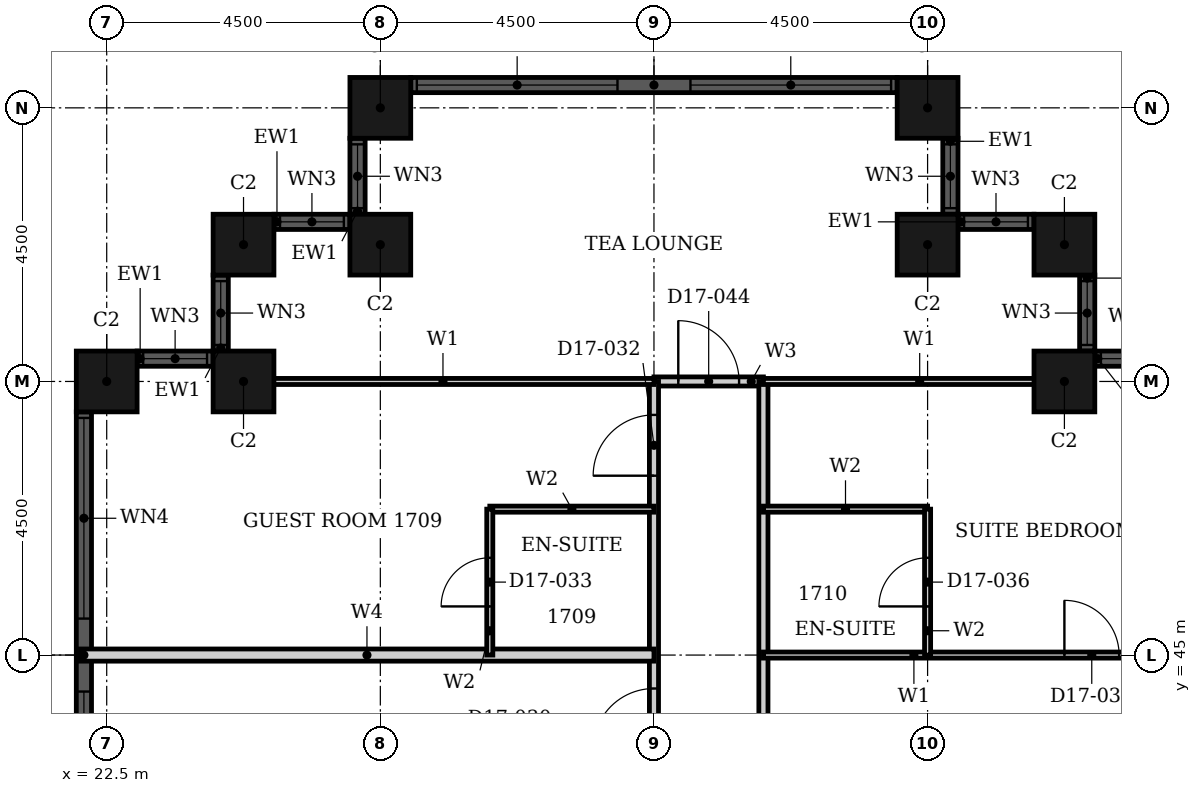
"""IFC4 building model, lengths in metres.
Left out: names, types, materials, properties, quantities, classifications, styles, units other than length and angle.
Written with IfcOpenShell. Run it as: python <this file> out.ifc"""

import sys

from ifc_helpers import new_model, si_unit, direction, frame, frame_2d, origin, origin_2d, place, context, subcontext, project, spatial, rectangle, hollow_rectangle, extrude, element, fill, save


model = new_model("IFC4")
c1 = context("Model", 3, precision=1e-05, world=origin(), true_north=direction((0.0, 1.0)))
c2 = subcontext(c1, "Body", "Model", "MODEL_VIEW")
j1 = project(units=[si_unit("LENGTHUNIT", "METRE"), si_unit("PLANEANGLEUNIT", "RADIAN")], contexts=[c1])
p1 = place(None, origin())
s1 = spatial("IfcSite", under=j1, at=p1, CompositionType="ELEMENT")
p2 = place(p1, origin())
s2 = spatial("IfcBuilding", under=s1, at=p2, CompositionType="ELEMENT")
p3 = place(p2, frame((0.0, 0.0, 74.4)))
s3 = spatial("IfcBuildingStorey", under=s2, at=p3, CompositionType="ELEMENT", Elevation=74.4)
for number, where, z_axis, x_axis in (
    (1, (38.25, 49.5, 0.0), (0.0, 0.0, 1.0), (1.0, 0.0, 0.0)),
    (2, (38.25, 51.75, 0.0), (0.0, 0.0, 1.0), (1.0, 0.0, 0.0)),
    (3, (36.0, 51.75, 0.0), (0.0, 0.0, 1.0), (1.0, 0.0, 0.0)),
    (4, (36.0, 54.0, 0.0), (0.0, 0.0, 1.0), (1.0, 0.0, 0.0)),
    (5, (27.0, 54.0, 0.0), (0.0, 0.0, 1.0), (1.0, 0.0, 0.0)),
    (6, (27.0, 51.75, 0.0), (0.0, 0.0, 1.0), (1.0, 0.0, 0.0)),
    (7, (24.75, 51.75, 0.0), (0.0, 0.0, 1.0), (1.0, 0.0, 0.0)),
    (8, (24.75, 49.5, 0.0), (0.0, 0.0, 1.0), (1.0, 0.0, 0.0)),
    (9, (22.5, 49.5, 0.0), (0.0, 0.0, 1.0), (1.0, 0.0, 0.0)),
):
    element("IfcColumn", number, at=place(p3, frame(where, z_axis=z_axis, x_axis=x_axis)), inside=s3, PredefinedType="COLUMN", context=c2, shape_type="SweptSolid", body=[
        extrude(hollow_rectangle(XDim=1.0, YDim=1.0, WallThickness=0.032, at=origin_2d()), origin(), (0.0, 0.0, 1.0), 3.6),
    ])
p4 = place(p3, frame((40.0, 49.875, 0.0), z_axis=(0.0, 0.0, 1.0), x_axis=(-1.0, 0.0, 0.0)))
e10 = element("IfcWall", 10, at=p4, inside=s3, PredefinedType="SOLIDWALL", context=c2, shape_type="SweptSolid", body=[
    extrude(rectangle(XDim=1.25, YDim=0.25, at=frame_2d((0.625, 0.0))), origin(), (0.0, 0.0, 1.0), 3.6),
])
p5 = place(p4, frame((0.1, 0.0, 0.9)))
e11 = element("IfcOpeningElement", 11, at=p5, cuts=e10, PredefinedType="OPENING", context=c2, shape_type="SweptSolid", body=[
    extrude(rectangle(XDim=1.05, YDim=2.08, at=frame_2d((0.525, 1.04))), frame((0.0, 0.135, 0.0), z_axis=(0.0, -1.0, 0.0), x_axis=(1.0, 0.0, 0.0)), (0.0, 0.0, 1.0), 0.27),
])
p6 = place(p3, frame((38.625, 50.0, 0.0), z_axis=(0.0, 0.0, 1.0), x_axis=(0.0, 1.0, 0.0)))
e12 = element("IfcWall", 12, at=p6, inside=s3, PredefinedType="SOLIDWALL", context=c2, shape_type="SweptSolid", body=[
    extrude(rectangle(XDim=1.25, YDim=0.25, at=frame_2d((0.625, 0.0))), origin(), (0.0, 0.0, 1.0), 3.6),
])
p7 = place(p6, frame((0.1, 0.0, 0.9)))
e13 = element("IfcOpeningElement", 13, at=p7, cuts=e12, PredefinedType="OPENING", context=c2, shape_type="SweptSolid", body=[
    extrude(rectangle(XDim=1.05, YDim=2.08, at=frame_2d((0.525, 1.04))), frame((0.0, 0.135, 0.0), z_axis=(0.0, -1.0, 0.0), x_axis=(1.0, 0.0, 0.0)), (0.0, 0.0, 1.0), 0.27),
])
p8 = place(p3, frame((37.75, 52.125, 0.0), z_axis=(0.0, 0.0, 1.0), x_axis=(-1.0, 0.0, 0.0)))
e14 = element("IfcWall", 14, at=p8, inside=s3, PredefinedType="SOLIDWALL", context=c2, shape_type="SweptSolid", body=[
    extrude(rectangle(XDim=1.25, YDim=0.25, at=frame_2d((0.625, 0.0))), origin(), (0.0, 0.0, 1.0), 3.6),
])
p9 = place(p8, frame((0.1, 0.0, 0.9)))
e15 = element("IfcOpeningElement", 15, at=p9, cuts=e14, PredefinedType="OPENING", context=c2, shape_type="SweptSolid", body=[
    extrude(rectangle(XDim=1.05, YDim=2.08, at=frame_2d((0.525, 1.04))), frame((0.0, 0.135, 0.0), z_axis=(0.0, -1.0, 0.0), x_axis=(1.0, 0.0, 0.0)), (0.0, 0.0, 1.0), 0.27),
])
p10 = place(p3, frame((36.375, 52.25, 0.0), z_axis=(0.0, 0.0, 1.0), x_axis=(0.0, 1.0, 0.0)))
e16 = element("IfcWall", 16, at=p10, inside=s3, PredefinedType="SOLIDWALL", context=c2, shape_type="SweptSolid", body=[
    extrude(rectangle(XDim=1.25, YDim=0.25, at=frame_2d((0.625, 0.0))), origin(), (0.0, 0.0, 1.0), 3.6),
])
p11 = place(p10, frame((0.1, 0.0, 0.9)))
e17 = element("IfcOpeningElement", 17, at=p11, cuts=e16, PredefinedType="OPENING", context=c2, shape_type="SweptSolid", body=[
    extrude(rectangle(XDim=1.05, YDim=2.08, at=frame_2d((0.525, 1.04))), frame((0.0, 0.135, 0.0), z_axis=(0.0, -1.0, 0.0), x_axis=(1.0, 0.0, 0.0)), (0.0, 0.0, 1.0), 0.27),
])
p12 = place(p3, frame((35.5, 54.375, 0.0), z_axis=(0.0, 0.0, 1.0), x_axis=(-1.0, 0.0, 0.0)))
e18 = element("IfcWall", 18, at=p12, inside=s3, PredefinedType="SOLIDWALL", context=c2, shape_type="SweptSolid", body=[
    extrude(rectangle(XDim=8.0, YDim=0.25, at=frame_2d((4.0, 0.0))), origin(), (0.0, 0.0, 1.0), 3.6),
])
p13 = place(p12, frame((0.1, 0.0, 0.9)))
e19 = element("IfcOpeningElement", 19, at=p13, cuts=e18, PredefinedType="OPENING", context=c2, shape_type="SweptSolid", body=[
    extrude(rectangle(XDim=3.3, YDim=2.08, at=frame_2d((1.65, 1.04))), frame((0.0, 0.135, 0.0), z_axis=(0.0, -1.0, 0.0), x_axis=(1.0, 0.0, 0.0)), (0.0, 0.0, 1.0), 0.27),
])
p14 = place(p12, frame((4.6, 0.0, 0.9)))
e20 = element("IfcOpeningElement", 20, at=p14, cuts=e18, PredefinedType="OPENING", context=c2, shape_type="SweptSolid", body=[
    extrude(rectangle(XDim=3.3, YDim=2.08, at=frame_2d((1.65, 1.04))), frame((0.0, 0.135, 0.0), z_axis=(0.0, -1.0, 0.0), x_axis=(1.0, 0.0, 0.0)), (0.0, 0.0, 1.0), 0.27),
])
p15 = place(p3, frame((26.625, 53.5, 0.0), z_axis=(0.0, 0.0, 1.0), x_axis=(0.0, -1.0, 0.0)))
e21 = element("IfcWall", 21, at=p15, inside=s3, PredefinedType="SOLIDWALL", context=c2, shape_type="SweptSolid", body=[
    extrude(rectangle(XDim=1.25, YDim=0.25, at=frame_2d((0.625, 0.0))), origin(), (0.0, 0.0, 1.0), 3.6),
])
p16 = place(p15, frame((0.1, 0.0, 0.9)))
e22 = element("IfcOpeningElement", 22, at=p16, cuts=e21, PredefinedType="OPENING", context=c2, shape_type="SweptSolid", body=[
    extrude(rectangle(XDim=1.05, YDim=2.08, at=frame_2d((0.525, 1.04))), frame((0.0, 0.135, 0.0), z_axis=(0.0, -1.0, 0.0), x_axis=(1.0, 0.0, 0.0)), (0.0, 0.0, 1.0), 0.27),
])
p17 = place(p3, frame((26.5, 52.125, 0.0), z_axis=(0.0, 0.0, 1.0), x_axis=(-1.0, 0.0, 0.0)))
e23 = element("IfcWall", 23, at=p17, inside=s3, PredefinedType="SOLIDWALL", context=c2, shape_type="SweptSolid", body=[
    extrude(rectangle(XDim=1.25, YDim=0.25, at=frame_2d((0.625, 0.0))), origin(), (0.0, 0.0, 1.0), 3.6),
])
p18 = place(p17, frame((0.1, 0.0, 0.9)))
e24 = element("IfcOpeningElement", 24, at=p18, cuts=e23, PredefinedType="OPENING", context=c2, shape_type="SweptSolid", body=[
    extrude(rectangle(XDim=1.05, YDim=2.08, at=frame_2d((0.525, 1.04))), frame((0.0, 0.135, 0.0), z_axis=(0.0, -1.0, 0.0), x_axis=(1.0, 0.0, 0.0)), (0.0, 0.0, 1.0), 0.27),
])
p19 = place(p3, frame((24.375, 51.25, 0.0), z_axis=(0.0, 0.0, 1.0), x_axis=(0.0, -1.0, 0.0)))
e25 = element("IfcWall", 25, at=p19, inside=s3, PredefinedType="SOLIDWALL", context=c2, shape_type="SweptSolid", body=[
    extrude(rectangle(XDim=1.25, YDim=0.25, at=frame_2d((0.625, 0.0))), origin(), (0.0, 0.0, 1.0), 3.6),
])
p20 = place(p19, frame((0.1, 0.0, 0.9)))
e26 = element("IfcOpeningElement", 26, at=p20, cuts=e25, PredefinedType="OPENING", context=c2, shape_type="SweptSolid", body=[
    extrude(rectangle(XDim=1.05, YDim=2.08, at=frame_2d((0.525, 1.04))), frame((0.0, 0.135, 0.0), z_axis=(0.0, -1.0, 0.0), x_axis=(1.0, 0.0, 0.0)), (0.0, 0.0, 1.0), 0.27),
])
p21 = place(p3, frame((24.25, 49.875, 0.0), z_axis=(0.0, 0.0, 1.0), x_axis=(-1.0, 0.0, 0.0)))
e27 = element("IfcWall", 27, at=p21, inside=s3, PredefinedType="SOLIDWALL", context=c2, shape_type="SweptSolid", body=[
    extrude(rectangle(XDim=1.25, YDim=0.25, at=frame_2d((0.625, 0.0))), origin(), (0.0, 0.0, 1.0), 3.6),
])
p22 = place(p21, frame((0.1, 0.0, 0.9)))
e28 = element("IfcOpeningElement", 28, at=p22, cuts=e27, PredefinedType="OPENING", context=c2, shape_type="SweptSolid", body=[
    extrude(rectangle(XDim=1.05, YDim=2.08, at=frame_2d((0.525, 1.04))), frame((0.0, 0.135, 0.0), z_axis=(0.0, -1.0, 0.0), x_axis=(1.0, 0.0, 0.0)), (0.0, 0.0, 1.0), 0.27),
])
p23 = place(p3, frame((22.125, 49.0, 0.0), z_axis=(0.0, 0.0, 1.0), x_axis=(0.0, -1.0, 0.0)))
e29 = element("IfcWall", 29, at=p23, inside=s3, PredefinedType="SOLIDWALL", context=c2, shape_type="SweptSolid", body=[
    extrude(rectangle(XDim=8.0, YDim=0.25, at=frame_2d((4.0, 0.0))), origin(), (0.0, 0.0, 1.0), 3.6),
])
p24 = place(p23, frame((0.1, 0.0, 0.9)))
e30 = element("IfcOpeningElement", 30, at=p24, cuts=e29, PredefinedType="OPENING", context=c2, shape_type="SweptSolid", body=[
    extrude(rectangle(XDim=3.3, YDim=2.08, at=frame_2d((1.65, 1.04))), frame((0.0, 0.135, 0.0), z_axis=(0.0, -1.0, 0.0), x_axis=(1.0, 0.0, 0.0)), (0.0, 0.0, 1.0), 0.27),
])
p25 = place(p23, frame((4.6, 0.0, 0.9)))
e31 = element("IfcOpeningElement", 31, at=p25, cuts=e29, PredefinedType="OPENING", context=c2, shape_type="SweptSolid", body=[
    extrude(rectangle(XDim=3.3, YDim=2.08, at=frame_2d((1.65, 1.04))), frame((0.0, 0.135, 0.0), z_axis=(0.0, -1.0, 0.0), x_axis=(1.0, 0.0, 0.0)), (0.0, 0.0, 1.0), 0.27),
])
p26 = place(p3, frame((31.5, 49.5, 0.0), z_axis=(0.0, 0.0, 1.0), x_axis=(1.0, 0.0, 0.0)))
e32 = element("IfcWall", 32, at=p26, inside=s3, PredefinedType="PARTITIONING", context=c2, shape_type="SweptSolid", body=[
    extrude(rectangle(XDim=1.8, YDim=0.15, at=frame_2d((0.9, 0.0))), origin(), (0.0, 0.0, 1.0), 3.3),
])
p27 = place(p26, frame((0.4, 0.0, 0.0)))
e33 = element("IfcOpeningElement", 33, at=p27, cuts=e32, PredefinedType="OPENING", context=c2, shape_type="SweptSolid", body=[
    extrude(rectangle(XDim=1.0, YDim=2.1, at=frame_2d((0.5, 1.05))), frame((0.0, 0.085, 0.0), z_axis=(0.0, -1.0, 0.0), x_axis=(1.0, 0.0, 0.0)), (0.0, 0.0, 1.0), 0.17),
])
p28 = place(p3, frame((31.5, 33.3, 0.0), z_axis=(0.0, 0.0, 1.0), x_axis=(0.0, 1.0, 0.0)))
e34 = element("IfcWall", 34, at=p28, inside=s3, PredefinedType="PARTITIONING", context=c2, shape_type="SweptSolid", body=[
    extrude(rectangle(XDim=16.2, YDim=0.15, at=frame_2d((8.1, 0.0))), origin(), (0.0, 0.0, 1.0), 2.58),
])
p29 = place(p28, frame((10.15, 0.0, 0.0)))
e35 = element("IfcOpeningElement", 35, at=p29, cuts=e34, PredefinedType="OPENING", context=c2, shape_type="SweptSolid", body=[
    extrude(rectangle(XDim=1.0, YDim=2.1, at=frame_2d((0.5, 1.05))), frame((0.0, 0.085, 0.0), z_axis=(0.0, -1.0, 0.0), x_axis=(1.0, 0.0, 0.0)), (0.0, 0.0, 1.0), 0.17),
])
p30 = place(p28, frame((14.65, 0.0, 0.0)))
e36 = element("IfcOpeningElement", 36, at=p30, cuts=e34, PredefinedType="OPENING", context=c2, shape_type="SweptSolid", body=[
    extrude(rectangle(XDim=1.0, YDim=2.1, at=frame_2d((0.5, 1.05))), frame((0.0, 0.085, 0.0), z_axis=(0.0, -1.0, 0.0), x_axis=(1.0, 0.0, 0.0)), (0.0, 0.0, 1.0), 0.17),
])
p31 = place(p3, frame((33.3, 33.3, 0.0), z_axis=(0.0, 0.0, 1.0), x_axis=(0.0, 1.0, 0.0)))
e37 = element("IfcWall", 37, at=p31, inside=s3, PredefinedType="PARTITIONING", context=c2, shape_type="SweptSolid", body=[
    extrude(rectangle(XDim=16.2, YDim=0.15, at=frame_2d((8.1, 0.0))), origin(), (0.0, 0.0, 1.0), 3.3),
])
p32 = place(p31, frame((8.95, 0.0, 0.0)))
e38 = element("IfcOpeningElement", 38, at=p32, cuts=e37, PredefinedType="OPENING", context=c2, shape_type="SweptSolid", body=[
    extrude(rectangle(XDim=1.0, YDim=2.1, at=frame_2d((0.5, 1.05))), frame((0.0, 0.085, 0.0), z_axis=(0.0, -1.0, 0.0), x_axis=(1.0, 0.0, 0.0)), (0.0, 0.0, 1.0), 0.17),
])
p33 = place(p3, frame((33.3, 45.0, 0.0), z_axis=(0.0, 0.0, 1.0), x_axis=(1.0, 0.0, 0.0)))
e39 = element("IfcWall", 39, at=p33, inside=s3, PredefinedType="PARTITIONING", context=c2, shape_type="SweptSolid", body=[
    extrude(rectangle(XDim=7.64, YDim=0.1, at=frame_2d((3.82, 0.0))), origin(), (0.0, 0.0, 1.0), 3.3),
])
p34 = place(p33, frame((4.95, 0.0, 0.0)))
e40 = element("IfcOpeningElement", 40, at=p34, cuts=e39, PredefinedType="OPENING", context=c2, shape_type="SweptSolid", body=[
    extrude(rectangle(XDim=0.9, YDim=2.1, at=frame_2d((0.45, 1.05))), frame((0.0, 0.06, 0.0), z_axis=(0.0, -1.0, 0.0), x_axis=(1.0, 0.0, 0.0)), (0.0, 0.0, 1.0), 0.12),
])
p35 = place(p3, frame((24.56, 49.5, 0.0), z_axis=(0.0, 0.0, 1.0), x_axis=(1.0, 0.0, 0.0)))
e41 = element("IfcWall", 41, at=p35, inside=s3, PredefinedType="PARTITIONING", context=c2, shape_type="SweptSolid", body=[
    extrude(rectangle(XDim=6.94, YDim=0.1, at=frame_2d((3.47, 0.0))), origin(), (0.0, 0.0, 1.0), 3.3),
])
p36 = place(p3, frame((33.3, 49.5, 0.0), z_axis=(0.0, 0.0, 1.0), x_axis=(1.0, 0.0, 0.0)))
e42 = element("IfcWall", 42, at=p36, inside=s3, PredefinedType="PARTITIONING", context=c2, shape_type="SweptSolid", body=[
    extrude(rectangle(XDim=5.14, YDim=0.1, at=frame_2d((2.57, 0.0))), origin(), (0.0, 0.0, 1.0), 3.3),
])
p37 = place(p3, frame((22.06, 45.0, 0.0), z_axis=(0.0, 0.0, 1.0), x_axis=(1.0, 0.0, 0.0)))
e43 = element("IfcWall", 43, at=p37, inside=s3, PredefinedType="PARTITIONING", context=c2, shape_type="SweptSolid", body=[
    extrude(rectangle(XDim=9.44, YDim=0.2, at=frame_2d((4.72, 0.0))), origin(), (0.0, 0.0, 1.0), 3.3),
])
for number, where, z_axis, x_axis in (
    (44, (28.8, 47.4, 0.0), (0.0, 0.0, 1.0), (1.0, 0.0, 0.0)),
    (45, (33.3, 47.4, 0.0), (0.0, 0.0, 1.0), (1.0, 0.0, 0.0)),
):
    element("IfcWall", number, at=place(p3, frame(where, z_axis=z_axis, x_axis=x_axis)), inside=s3, PredefinedType="PARTITIONING", context=c2, shape_type="SweptSolid", body=[
        extrude(rectangle(XDim=2.7, YDim=0.1, at=frame_2d((1.35, 0.0))), origin(), (0.0, 0.0, 1.0), 3.3),
    ])
p38 = place(p3, frame((28.8, 45.0, 0.0), z_axis=(0.0, 0.0, 1.0), x_axis=(0.0, 1.0, 0.0)))
e46 = element("IfcWall", 46, at=p38, inside=s3, PredefinedType="PARTITIONING", context=c2, shape_type="SweptSolid", body=[
    extrude(rectangle(XDim=2.4, YDim=0.1, at=frame_2d((1.2, 0.0))), origin(), (0.0, 0.0, 1.0), 3.3),
])
p39 = place(p38, frame((0.8, 0.0, 0.0)))
e47 = element("IfcOpeningElement", 47, at=p39, cuts=e46, PredefinedType="OPENING", context=c2, shape_type="SweptSolid", body=[
    extrude(rectangle(XDim=0.8, YDim=2.1, at=frame_2d((0.4, 1.05))), frame((0.0, 0.06, 0.0), z_axis=(0.0, -1.0, 0.0), x_axis=(1.0, 0.0, 0.0)), (0.0, 0.0, 1.0), 0.12),
])
p40 = place(p3, frame((36.0, 45.0, 0.0), z_axis=(0.0, 0.0, 1.0), x_axis=(0.0, 1.0, 0.0)))
e48 = element("IfcWall", 48, at=p40, inside=s3, PredefinedType="PARTITIONING", context=c2, shape_type="SweptSolid", body=[
    extrude(rectangle(XDim=2.4, YDim=0.1, at=frame_2d((1.2, 0.0))), origin(), (0.0, 0.0, 1.0), 2.58),
])
p41 = place(p40, frame((0.8, 0.0, 0.0)))
e49 = element("IfcOpeningElement", 49, at=p41, cuts=e48, PredefinedType="OPENING", context=c2, shape_type="SweptSolid", body=[
    extrude(rectangle(XDim=0.8, YDim=2.1, at=frame_2d((0.4, 1.05))), frame((0.0, 0.06, 0.0), z_axis=(0.0, -1.0, 0.0), x_axis=(1.0, 0.0, 0.0)), (0.0, 0.0, 1.0), 0.12),
])
p42 = place(p5, origin())
e50 = element("IfcWindow", 50, at=p42, inside=s3, PartitioningType="SINGLE_PANEL", PredefinedType="WINDOW", context=c2, shape_type="SweptSolid", body=[
    extrude(rectangle(XDim=1.05, YDim=2.08, at=frame_2d((0.525, 1.04))), frame((0.0, 0.03, 0.0), z_axis=(0.0, -1.0, 0.0), x_axis=(1.0, 0.0, 0.0)), (0.0, 0.0, 1.0), 0.06),
])
fill(e11, e50)
p43 = place(p7, origin())
e51 = element("IfcWindow", 51, at=p43, inside=s3, PartitioningType="SINGLE_PANEL", PredefinedType="WINDOW", context=c2, shape_type="SweptSolid", body=[
    extrude(rectangle(XDim=1.05, YDim=2.08, at=frame_2d((0.525, 1.04))), frame((0.0, 0.03, 0.0), z_axis=(0.0, -1.0, 0.0), x_axis=(1.0, 0.0, 0.0)), (0.0, 0.0, 1.0), 0.06),
])
fill(e13, e51)
p44 = place(p9, origin())
e52 = element("IfcWindow", 52, at=p44, inside=s3, PartitioningType="SINGLE_PANEL", PredefinedType="WINDOW", context=c2, shape_type="SweptSolid", body=[
    extrude(rectangle(XDim=1.05, YDim=2.08, at=frame_2d((0.525, 1.04))), frame((0.0, 0.03, 0.0), z_axis=(0.0, -1.0, 0.0), x_axis=(1.0, 0.0, 0.0)), (0.0, 0.0, 1.0), 0.06),
])
fill(e15, e52)
p45 = place(p11, origin())
e53 = element("IfcWindow", 53, at=p45, inside=s3, PartitioningType="SINGLE_PANEL", PredefinedType="WINDOW", context=c2, shape_type="SweptSolid", body=[
    extrude(rectangle(XDim=1.05, YDim=2.08, at=frame_2d((0.525, 1.04))), frame((0.0, 0.03, 0.0), z_axis=(0.0, -1.0, 0.0), x_axis=(1.0, 0.0, 0.0)), (0.0, 0.0, 1.0), 0.06),
])
fill(e17, e53)
p46 = place(p13, origin())
e54 = element("IfcWindow", 54, at=p46, inside=s3, PartitioningType="SINGLE_PANEL", PredefinedType="WINDOW", context=c2, shape_type="SweptSolid", body=[
    extrude(rectangle(XDim=3.3, YDim=2.08, at=frame_2d((1.65, 1.04))), frame((0.0, 0.03, 0.0), z_axis=(0.0, -1.0, 0.0), x_axis=(1.0, 0.0, 0.0)), (0.0, 0.0, 1.0), 0.06),
])
fill(e19, e54)
p47 = place(p14, origin())
e55 = element("IfcWindow", 55, at=p47, inside=s3, PartitioningType="SINGLE_PANEL", PredefinedType="WINDOW", context=c2, shape_type="SweptSolid", body=[
    extrude(rectangle(XDim=3.3, YDim=2.08, at=frame_2d((1.65, 1.04))), frame((0.0, 0.03, 0.0), z_axis=(0.0, -1.0, 0.0), x_axis=(1.0, 0.0, 0.0)), (0.0, 0.0, 1.0), 0.06),
])
fill(e20, e55)
p48 = place(p16, origin())
e56 = element("IfcWindow", 56, at=p48, inside=s3, PartitioningType="SINGLE_PANEL", PredefinedType="WINDOW", context=c2, shape_type="SweptSolid", body=[
    extrude(rectangle(XDim=1.05, YDim=2.08, at=frame_2d((0.525, 1.04))), frame((0.0, 0.03, 0.0), z_axis=(0.0, -1.0, 0.0), x_axis=(1.0, 0.0, 0.0)), (0.0, 0.0, 1.0), 0.06),
])
fill(e22, e56)
p49 = place(p18, origin())
e57 = element("IfcWindow", 57, at=p49, inside=s3, PartitioningType="SINGLE_PANEL", PredefinedType="WINDOW", context=c2, shape_type="SweptSolid", body=[
    extrude(rectangle(XDim=1.05, YDim=2.08, at=frame_2d((0.525, 1.04))), frame((0.0, 0.03, 0.0), z_axis=(0.0, -1.0, 0.0), x_axis=(1.0, 0.0, 0.0)), (0.0, 0.0, 1.0), 0.06),
])
fill(e24, e57)
p50 = place(p20, origin())
e58 = element("IfcWindow", 58, at=p50, inside=s3, PartitioningType="SINGLE_PANEL", PredefinedType="WINDOW", context=c2, shape_type="SweptSolid", body=[
    extrude(rectangle(XDim=1.05, YDim=2.08, at=frame_2d((0.525, 1.04))), frame((0.0, 0.03, 0.0), z_axis=(0.0, -1.0, 0.0), x_axis=(1.0, 0.0, 0.0)), (0.0, 0.0, 1.0), 0.06),
])
fill(e26, e58)
p51 = place(p22, origin())
e59 = element("IfcWindow", 59, at=p51, inside=s3, PartitioningType="SINGLE_PANEL", PredefinedType="WINDOW", context=c2, shape_type="SweptSolid", body=[
    extrude(rectangle(XDim=1.05, YDim=2.08, at=frame_2d((0.525, 1.04))), frame((0.0, 0.03, 0.0), z_axis=(0.0, -1.0, 0.0), x_axis=(1.0, 0.0, 0.0)), (0.0, 0.0, 1.0), 0.06),
])
fill(e28, e59)
p52 = place(p24, origin())
e60 = element("IfcWindow", 60, at=p52, inside=s3, PartitioningType="SINGLE_PANEL", PredefinedType="WINDOW", context=c2, shape_type="SweptSolid", body=[
    extrude(rectangle(XDim=3.3, YDim=2.08, at=frame_2d((1.65, 1.04))), frame((0.0, 0.03, 0.0), z_axis=(0.0, -1.0, 0.0), x_axis=(1.0, 0.0, 0.0)), (0.0, 0.0, 1.0), 0.06),
])
fill(e30, e60)
p53 = place(p25, origin())
e61 = element("IfcWindow", 61, at=p53, inside=s3, PartitioningType="SINGLE_PANEL", PredefinedType="WINDOW", context=c2, shape_type="SweptSolid", body=[
    extrude(rectangle(XDim=3.3, YDim=2.08, at=frame_2d((1.65, 1.04))), frame((0.0, 0.03, 0.0), z_axis=(0.0, -1.0, 0.0), x_axis=(1.0, 0.0, 0.0)), (0.0, 0.0, 1.0), 0.06),
])
fill(e31, e61)
p54 = place(p29, origin())
e62 = element("IfcDoor", 62, at=p54, inside=s3, OperationType="SINGLE_SWING_RIGHT", PredefinedType="DOOR", context=c2, shape_type="SweptSolid", body=[
    extrude(rectangle(XDim=1.0, YDim=2.1, at=frame_2d((0.5, 1.05))), frame((0.0, 0.025, 0.0), z_axis=(0.0, -1.0, 0.0), x_axis=(1.0, 0.0, 0.0)), (0.0, 0.0, 1.0), 0.05),
])
fill(e35, e62)
p55 = place(p30, origin())
e63 = element("IfcDoor", 63, at=p55, inside=s3, OperationType="SINGLE_SWING_RIGHT", PredefinedType="DOOR", context=c2, shape_type="SweptSolid", body=[
    extrude(rectangle(XDim=1.0, YDim=2.1, at=frame_2d((0.5, 1.05))), frame((0.0, 0.025, 0.0), z_axis=(0.0, -1.0, 0.0), x_axis=(1.0, 0.0, 0.0)), (0.0, 0.0, 1.0), 0.05),
])
fill(e36, e63)
p56 = place(p39, origin())
e64 = element("IfcDoor", 64, at=p56, inside=s3, OperationType="SINGLE_SWING_RIGHT", PredefinedType="DOOR", context=c2, shape_type="SweptSolid", body=[
    extrude(rectangle(XDim=0.8, YDim=2.1, at=frame_2d((0.4, 1.05))), frame((0.0, 0.025, 0.0), z_axis=(0.0, -1.0, 0.0), x_axis=(1.0, 0.0, 0.0)), (0.0, 0.0, 1.0), 0.05),
])
fill(e47, e64)
p57 = place(p34, origin())
e65 = element("IfcDoor", 65, at=p57, inside=s3, OperationType="SINGLE_SWING_RIGHT", PredefinedType="DOOR", context=c2, shape_type="SweptSolid", body=[
    extrude(rectangle(XDim=0.9, YDim=2.1, at=frame_2d((0.45, 1.05))), frame((0.0, 0.025, 0.0), z_axis=(0.0, -1.0, 0.0), x_axis=(1.0, 0.0, 0.0)), (0.0, 0.0, 1.0), 0.05),
])
fill(e40, e65)
p58 = place(p41, origin())
e66 = element("IfcDoor", 66, at=p58, inside=s3, OperationType="SINGLE_SWING_RIGHT", PredefinedType="DOOR", context=c2, shape_type="SweptSolid", body=[
    extrude(rectangle(XDim=0.8, YDim=2.1, at=frame_2d((0.4, 1.05))), frame((0.0, 0.025, 0.0), z_axis=(0.0, -1.0, 0.0), x_axis=(1.0, 0.0, 0.0)), (0.0, 0.0, 1.0), 0.05),
])
fill(e49, e66)
p59 = place(p27, origin())
e67 = element("IfcDoor", 67, at=p59, inside=s3, OperationType="SINGLE_SWING_LEFT", PredefinedType="DOOR", context=c2, shape_type="SweptSolid", body=[
    extrude(rectangle(XDim=1.0, YDim=2.1, at=frame_2d((0.5, 1.05))), frame((0.0, 0.025, 0.0), z_axis=(0.0, -1.0, 0.0), x_axis=(1.0, 0.0, 0.0)), (0.0, 0.0, 1.0), 0.05),
])
fill(e33, e67)
save(model, sys.argv[1])
